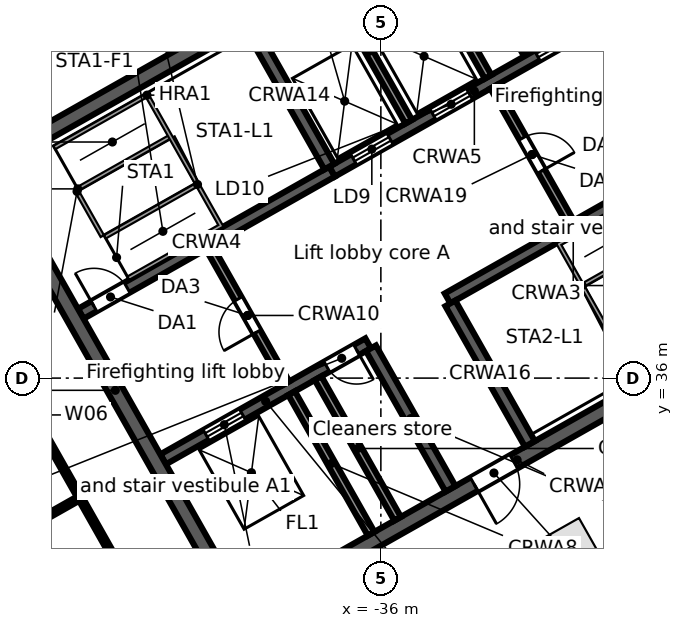
"""IFC4 building model, lengths in metres.
Left out: names, types, materials, properties, quantities, classifications, styles, units other than length and angle.
Written with IfcOpenShell. Run it as: python <this file> out.ifc"""

import sys

from ifc_helpers import new_model, si_unit, direction, frame, frame_2d, origin, origin_2d, place, context, subcontext, project, spatial, rectangle, extrude, element, fill, save


model = new_model("IFC4")
c1 = context("Model", 3, precision=1e-05, world=origin(), true_north=direction((0.0, 1.0)))
c2 = subcontext(c1, "Body", "Model", "MODEL_VIEW")
j1 = project(units=[si_unit("LENGTHUNIT", "METRE"), si_unit("PLANEANGLEUNIT", "RADIAN")], contexts=[c1])
p1 = place(None, origin())
s1 = spatial("IfcSite", under=j1, at=p1, CompositionType="ELEMENT")
p2 = place(p1, origin())
s2 = spatial("IfcBuilding", under=s1, at=p2, CompositionType="ELEMENT")
p3 = place(p2, frame((0.0, 0.0, 343.1)))
s3 = spatial("IfcBuildingStorey", under=s2, at=p3, CompositionType="ELEMENT", Elevation=343.1)
p4 = place(p3, frame((-30.976, 31.635, 0.0), z_axis=(0.0, 0.0, 1.0), x_axis=(0.87035569594, 0.492423560103, 0.0)))
e1 = element("IfcColumn", 1, at=p4, inside=s3, PredefinedType="COLUMN", context=c2, shape_type="SweptSolid", body=[
    extrude(rectangle(XDim=1.0, YDim=1.0, at=origin_2d()), origin(), (0.0, 0.0, 1.0), 3.8),
])
p5 = place(p3, frame((-44.115, 26.507, 0.0), z_axis=(0.0, 0.0, 1.0), x_axis=(-0.857166583633, 0.515039268311, 0.0)))
e2 = element("IfcWall", 2, at=p5, inside=s3, PredefinedType="STANDARD", context=c2, shape_type="SweptSolid", body=[
    extrude(rectangle(XDim=17.106, YDim=0.25, at=frame_2d((8.553, 0.0))), origin(), (0.0, 0.0, 1.0), 3.5),
])
p6 = place(p5, frame((14.417, 0.0, 0.8)))
e3 = element("IfcOpeningElement", 3, at=p6, cuts=e2, PredefinedType="OPENING", context=c2, shape_type="SweptSolid", body=[
    extrude(rectangle(XDim=2.4, YDim=2.2, at=frame_2d((1.2, 1.1))), frame((0.0, 0.135, 0.0), z_axis=(0.0, -1.0, 0.0), x_axis=(1.0, 0.0, 0.0)), (0.0, 0.0, 1.0), 0.27),
])
p7 = place(p5, frame((11.584, 0.0, 0.8)))
e4 = element("IfcOpeningElement", 4, at=p7, cuts=e2, PredefinedType="OPENING", context=c2, shape_type="SweptSolid", body=[
    extrude(rectangle(XDim=2.4, YDim=2.2, at=frame_2d((1.2, 1.1))), frame((0.0, 0.135, 0.0), z_axis=(0.0, -1.0, 0.0), x_axis=(1.0, 0.0, 0.0)), (0.0, 0.0, 1.0), 0.27),
])
p8 = place(p5, frame((8.75, 0.0, 0.8)))
e5 = element("IfcOpeningElement", 5, at=p8, cuts=e2, PredefinedType="OPENING", context=c2, shape_type="SweptSolid", body=[
    extrude(rectangle(XDim=2.4, YDim=2.2, at=frame_2d((1.2, 1.1))), frame((0.0, 0.135, 0.0), z_axis=(0.0, -1.0, 0.0), x_axis=(1.0, 0.0, 0.0)), (0.0, 0.0, 1.0), 0.27),
])
p9 = place(p5, frame((5.917, 0.0, 0.8)))
e6 = element("IfcOpeningElement", 6, at=p9, cuts=e2, PredefinedType="OPENING", context=c2, shape_type="SweptSolid", body=[
    extrude(rectangle(XDim=2.4, YDim=2.2, at=frame_2d((1.2, 1.1))), frame((0.0, 0.135, 0.0), z_axis=(0.0, -1.0, 0.0), x_axis=(1.0, 0.0, 0.0)), (0.0, 0.0, 1.0), 0.27),
])
p10 = place(p5, frame((3.084, 0.0, 0.8)))
e7 = element("IfcOpeningElement", 7, at=p10, cuts=e2, PredefinedType="OPENING", context=c2, shape_type="SweptSolid", body=[
    extrude(rectangle(XDim=2.4, YDim=2.2, at=frame_2d((1.2, 1.1))), frame((0.0, 0.135, 0.0), z_axis=(0.0, -1.0, 0.0), x_axis=(1.0, 0.0, 0.0)), (0.0, 0.0, 1.0), 0.27),
])
p11 = place(p5, frame((0.25, 0.0, 0.8)))
e8 = element("IfcOpeningElement", 8, at=p11, cuts=e2, PredefinedType="OPENING", context=c2, shape_type="SweptSolid", body=[
    extrude(rectangle(XDim=2.4, YDim=2.2, at=frame_2d((1.2, 1.1))), frame((0.0, 0.135, 0.0), z_axis=(0.0, -1.0, 0.0), x_axis=(1.0, 0.0, 0.0)), (0.0, 0.0, 1.0), 0.27),
])
p12 = place(p3, frame((-3.017, 46.293, 0.0), z_axis=(0.0, 0.0, 1.0), x_axis=(-0.870355474887, -0.492423950812, 0.0)))
e9 = element("IfcWall", 9, at=p12, inside=s3, PredefinedType="STANDARD", context=c2, shape_type="SweptSolid", body=[
    extrude(rectangle(XDim=40.34, YDim=0.25, at=frame_2d((20.17, 0.0))), origin(), (0.0, 0.0, 1.0), 3.5),
])
p13 = place(p12, frame((37.428, 0.0, 0.8)))
e10 = element("IfcOpeningElement", 10, at=p13, cuts=e9, PredefinedType="OPENING", context=c2, shape_type="SweptSolid", body=[
    extrude(rectangle(XDim=2.4, YDim=2.2, at=frame_2d((1.2, 1.1))), frame((0.0, 0.135, 0.0), z_axis=(0.0, -1.0, 0.0), x_axis=(1.0, 0.0, 0.0)), (0.0, 0.0, 1.0), 0.27),
])
p14 = place(p12, frame((34.372, 0.0, 0.0)))
e11 = element("IfcOpeningElement", 11, at=p14, cuts=e9, PredefinedType="OPENING", context=c2, shape_type="SweptSolid", body=[
    extrude(rectangle(XDim=1.8, YDim=2.4, at=frame_2d((0.9, 1.2))), frame((0.0, 0.135, 0.0), z_axis=(0.0, -1.0, 0.0), x_axis=(1.0, 0.0, 0.0)), (0.0, 0.0, 1.0), 0.27),
])
p15 = place(p12, frame((30.716, 0.0, 0.8)))
e12 = element("IfcOpeningElement", 12, at=p15, cuts=e9, PredefinedType="OPENING", context=c2, shape_type="SweptSolid", body=[
    extrude(rectangle(XDim=2.4, YDim=2.2, at=frame_2d((1.2, 1.1))), frame((0.0, 0.135, 0.0), z_axis=(0.0, -1.0, 0.0), x_axis=(1.0, 0.0, 0.0)), (0.0, 0.0, 1.0), 0.27),
])
p16 = place(p12, frame((27.36, 0.0, 0.8)))
e13 = element("IfcOpeningElement", 13, at=p16, cuts=e9, PredefinedType="OPENING", context=c2, shape_type="SweptSolid", body=[
    extrude(rectangle(XDim=2.4, YDim=2.2, at=frame_2d((1.2, 1.1))), frame((0.0, 0.135, 0.0), z_axis=(0.0, -1.0, 0.0), x_axis=(1.0, 0.0, 0.0)), (0.0, 0.0, 1.0), 0.27),
])
p17 = place(p12, frame((24.304, 0.0, 0.0)))
e14 = element("IfcOpeningElement", 14, at=p17, cuts=e9, PredefinedType="OPENING", context=c2, shape_type="SweptSolid", body=[
    extrude(rectangle(XDim=1.8, YDim=2.4, at=frame_2d((0.9, 1.2))), frame((0.0, 0.135, 0.0), z_axis=(0.0, -1.0, 0.0), x_axis=(1.0, 0.0, 0.0)), (0.0, 0.0, 1.0), 0.27),
])
p18 = place(p12, frame((20.648, 0.0, 0.8)))
e15 = element("IfcOpeningElement", 15, at=p18, cuts=e9, PredefinedType="OPENING", context=c2, shape_type="SweptSolid", body=[
    extrude(rectangle(XDim=2.4, YDim=2.2, at=frame_2d((1.2, 1.1))), frame((0.0, 0.135, 0.0), z_axis=(0.0, -1.0, 0.0), x_axis=(1.0, 0.0, 0.0)), (0.0, 0.0, 1.0), 0.27),
])
p19 = place(p12, frame((17.292, 0.0, 0.8)))
e16 = element("IfcOpeningElement", 16, at=p19, cuts=e9, PredefinedType="OPENING", context=c2, shape_type="SweptSolid", body=[
    extrude(rectangle(XDim=2.4, YDim=2.2, at=frame_2d((1.2, 1.1))), frame((0.0, 0.135, 0.0), z_axis=(0.0, -1.0, 0.0), x_axis=(1.0, 0.0, 0.0)), (0.0, 0.0, 1.0), 0.27),
])
p20 = place(p12, frame((14.236, 0.0, 0.0)))
e17 = element("IfcOpeningElement", 17, at=p20, cuts=e9, PredefinedType="OPENING", context=c2, shape_type="SweptSolid", body=[
    extrude(rectangle(XDim=1.8, YDim=2.4, at=frame_2d((0.9, 1.2))), frame((0.0, 0.135, 0.0), z_axis=(0.0, -1.0, 0.0), x_axis=(1.0, 0.0, 0.0)), (0.0, 0.0, 1.0), 0.27),
])
p21 = place(p12, frame((10.58, 0.0, 0.8)))
e18 = element("IfcOpeningElement", 18, at=p21, cuts=e9, PredefinedType="OPENING", context=c2, shape_type="SweptSolid", body=[
    extrude(rectangle(XDim=2.4, YDim=2.2, at=frame_2d((1.2, 1.1))), frame((0.0, 0.135, 0.0), z_axis=(0.0, -1.0, 0.0), x_axis=(1.0, 0.0, 0.0)), (0.0, 0.0, 1.0), 0.27),
])
p22 = place(p12, frame((7.224, 0.0, 0.8)))
e19 = element("IfcOpeningElement", 19, at=p22, cuts=e9, PredefinedType="OPENING", context=c2, shape_type="SweptSolid", body=[
    extrude(rectangle(XDim=2.4, YDim=2.2, at=frame_2d((1.2, 1.1))), frame((0.0, 0.135, 0.0), z_axis=(0.0, -1.0, 0.0), x_axis=(1.0, 0.0, 0.0)), (0.0, 0.0, 1.0), 0.27),
])
p23 = place(p12, frame((4.168, 0.0, 0.0)))
e20 = element("IfcOpeningElement", 20, at=p23, cuts=e9, PredefinedType="OPENING", context=c2, shape_type="SweptSolid", body=[
    extrude(rectangle(XDim=1.8, YDim=2.4, at=frame_2d((0.9, 1.2))), frame((0.0, 0.135, 0.0), z_axis=(0.0, -1.0, 0.0), x_axis=(1.0, 0.0, 0.0)), (0.0, 0.0, 1.0), 0.27),
])
p24 = place(p12, frame((0.512, 0.0, 0.8)))
e21 = element("IfcOpeningElement", 21, at=p24, cuts=e9, PredefinedType="OPENING", context=c2, shape_type="SweptSolid", body=[
    extrude(rectangle(XDim=2.4, YDim=2.2, at=frame_2d((1.2, 1.1))), frame((0.0, 0.135, 0.0), z_axis=(0.0, -1.0, 0.0), x_axis=(1.0, 0.0, 0.0)), (0.0, 0.0, 1.0), 0.27),
])
p25 = place(p3, frame((-39.813, 29.662, 0.0), z_axis=(0.0, 0.0, 1.0), x_axis=(0.870350116061, 0.492433422375, 0.0)))
e22 = element("IfcWall", 22, at=p25, inside=s3, PredefinedType="SOLIDWALL", context=c2, shape_type="SweptSolid", body=[
    extrude(rectangle(XDim=17.0, YDim=0.4, at=frame_2d((8.5, 0.0))), origin(), (0.0, 0.0, 1.0), 3.5),
])
p26 = place(p25, frame((7.2, 0.0, 0.0)))
e23 = element("IfcOpeningElement", 23, at=p26, cuts=e22, PredefinedType="OPENING", context=c2, shape_type="SweptSolid", body=[
    extrude(rectangle(XDim=1.2, YDim=2.1, at=frame_2d((0.6, 1.05))), frame((0.0, 0.21, 0.0), z_axis=(0.0, -1.0, 0.0), x_axis=(1.0, 0.0, 0.0)), (0.0, 0.0, 1.0), 0.42),
])
p27 = place(p3, frame((-41.73, 33.863, 0.0), z_axis=(0.0, 0.0, 1.0), x_axis=(0.870350800578, 0.492432212525, 0.0)))
e24 = element("IfcWall", 24, at=p27, inside=s3, PredefinedType="SOLIDWALL", context=c2, shape_type="SweptSolid", body=[
    extrude(rectangle(XDim=6.2, YDim=0.3, at=frame_2d((3.1, 0.0))), origin(), (0.0, 0.0, 1.0), 3.5),
])
p28 = place(p27, frame((1.3, 0.0, 0.0)))
e25 = element("IfcOpeningElement", 25, at=p28, cuts=e24, PredefinedType="OPENING", context=c2, shape_type="SweptSolid", body=[
    extrude(rectangle(XDim=1.1, YDim=2.1, at=frame_2d((0.55, 1.05))), frame((0.0, 0.16, 0.0), z_axis=(0.0, -1.0, 0.0), x_axis=(1.0, 0.0, 0.0)), (0.0, 0.0, 1.0), 0.32),
])
p29 = place(p27, frame((4.95, 0.0, 0.0)))
e26 = element("IfcOpeningElement", 26, at=p29, cuts=e24, PredefinedType="OPENING", context=c2, shape_type="SweptSolid", body=[
    extrude(rectangle(XDim=0.9, YDim=2.1, at=frame_2d((0.45, 1.05))), frame((0.0, 0.16, 0.0), z_axis=(0.0, -1.0, 0.0), x_axis=(1.0, 0.0, 0.0)), (0.0, 0.0, 1.0), 0.32),
])
p30 = place(p3, frame((-34.245, 38.097, 0.0), z_axis=(0.0, 0.0, 1.0), x_axis=(0.870356351998, 0.492422400523, 0.0)))
e27 = element("IfcWall", 27, at=p30, inside=s3, PredefinedType="SOLIDWALL", context=c2, shape_type="SweptSolid", body=[
    extrude(rectangle(XDim=7.6, YDim=0.3, at=frame_2d((3.8, 0.0))), origin(), (0.0, 0.0, 1.0), 3.5),
])
p31 = place(p30, frame((6.2, 0.0, 0.0)))
e28 = element("IfcOpeningElement", 28, at=p31, cuts=e27, PredefinedType="OPENING", context=c2, shape_type="SweptSolid", body=[
    extrude(rectangle(XDim=1.0, YDim=2.1, at=frame_2d((0.5, 1.05))), frame((0.0, 0.16, 0.0), z_axis=(0.0, -1.0, 0.0), x_axis=(1.0, 0.0, 0.0)), (0.0, 0.0, 1.0), 0.32),
])
p32 = place(p3, frame((-43.897, 37.692, 0.0), z_axis=(0.0, 0.0, 1.0), x_axis=(0.870356351998, 0.492422400523, 0.0)))
e29 = element("IfcWall", 29, at=p32, inside=s3, PredefinedType="SOLIDWALL", context=c2, shape_type="SweptSolid", body=[
    extrude(rectangle(XDim=7.6, YDim=0.3, at=frame_2d((3.8, 0.0))), origin(), (0.0, 0.0, 1.0), 3.5),
])
p33 = place(p32, frame((0.4, 0.0, 0.0)))
e30 = element("IfcOpeningElement", 30, at=p33, cuts=e29, PredefinedType="OPENING", context=c2, shape_type="SweptSolid", body=[
    extrude(rectangle(XDim=1.0, YDim=2.1, at=frame_2d((0.5, 1.05))), frame((0.0, 0.16, 0.0), z_axis=(0.0, -1.0, 0.0), x_axis=(1.0, 0.0, 0.0)), (0.0, 0.0, 1.0), 0.32),
])
p34 = place(p3, frame((-37.282, 41.435, 0.0), z_axis=(0.0, 0.0, 1.0), x_axis=(0.870361315115, 0.492413628113, 0.0)))
e31 = element("IfcWall", 31, at=p34, inside=s3, PredefinedType="SOLIDWALL", context=c2, shape_type="SweptSolid", body=[
    extrude(rectangle(XDim=8.6, YDim=0.3, at=frame_2d((4.3, 0.0))), origin(), (0.0, 0.0, 1.0), 3.5),
])
p35 = place(p34, frame((0.65, 0.0, 0.0)))
e32 = element("IfcOpeningElement", 32, at=p35, cuts=e31, PredefinedType="OPENING", context=c2, shape_type="SweptSolid", body=[
    extrude(rectangle(XDim=1.1, YDim=2.1, at=frame_2d((0.55, 1.05))), frame((0.0, 0.16, 0.0), z_axis=(0.0, -1.0, 0.0), x_axis=(1.0, 0.0, 0.0)), (0.0, 0.0, 1.0), 0.32),
])
p36 = place(p34, frame((3.05, 0.0, 0.0)))
e33 = element("IfcOpeningElement", 33, at=p36, cuts=e31, PredefinedType="OPENING", context=c2, shape_type="SweptSolid", body=[
    extrude(rectangle(XDim=1.1, YDim=2.1, at=frame_2d((0.55, 1.05))), frame((0.0, 0.16, 0.0), z_axis=(0.0, -1.0, 0.0), x_axis=(1.0, 0.0, 0.0)), (0.0, 0.0, 1.0), 0.32),
])
p37 = place(p34, frame((6.2, 0.0, 0.0)))
e34 = element("IfcOpeningElement", 34, at=p37, cuts=e31, PredefinedType="OPENING", context=c2, shape_type="SweptSolid", body=[
    extrude(rectangle(XDim=1.1, YDim=2.1, at=frame_2d((0.55, 1.05))), frame((0.0, 0.16, 0.0), z_axis=(0.0, -1.0, 0.0), x_axis=(1.0, 0.0, 0.0)), (0.0, 0.0, 1.0), 0.32),
])
p38 = place(p3, frame((-46.51, 41.499, 0.0), z_axis=(0.0, 0.0, 1.0), x_axis=(0.870356271124, 0.492422543467, 0.0)))
e35 = element("IfcWall", 35, at=p38, inside=s3, PredefinedType="SOLIDWALL", context=c2, shape_type="SweptSolid", body=[
    extrude(rectangle(XDim=17.0, YDim=0.4, at=frame_2d((8.5, 0.0))), origin(), (0.0, 0.0, 1.0), 3.5),
])
p39 = place(p3, frame((-46.238, 41.423, 0.0), z_axis=(0.0, 0.0, 1.0), x_axis=(0.492421663121, -0.870356769198, 0.0)))
e36 = element("IfcWall", 36, at=p39, inside=s3, PredefinedType="SOLIDWALL", context=c2, shape_type="SweptSolid", body=[
    extrude(rectangle(XDim=13.2, YDim=0.4, at=frame_2d((6.6, 0.0))), origin(), (0.0, 0.0, 1.0), 3.5),
])
p40 = place(p3, frame((-38.349, 35.603, 0.0), z_axis=(0.0, 0.0, 1.0), x_axis=(0.492397924348, -0.870370199454, 0.0)))
e37 = element("IfcWall", 37, at=p40, inside=s3, PredefinedType="SOLIDWALL", context=c2, shape_type="SweptSolid", body=[
    extrude(rectangle(XDim=4.25, YDim=0.2, at=frame_2d((2.125, 0.0))), origin(), (0.0, 0.0, 1.0), 3.5),
])
p41 = place(p3, frame((-40.516, 39.433, 0.0), z_axis=(0.0, 0.0, 1.0), x_axis=(0.492453559952, -0.87033872216, 0.0)))
e38 = element("IfcWall", 38, at=p41, inside=s3, PredefinedType="PARTITIONING", context=c2, shape_type="SweptSolid", body=[
    extrude(rectangle(XDim=4.1, YDim=0.2, at=frame_2d((2.05, 0.0))), origin(), (0.0, 0.0, 1.0), 3.5),
])
p42 = place(p41, frame((1.55, 0.0, 0.0)))
e39 = element("IfcOpeningElement", 39, at=p42, cuts=e38, PredefinedType="OPENING", context=c2, shape_type="SweptSolid", body=[
    extrude(rectangle(XDim=1.0, YDim=2.1, at=frame_2d((0.5, 1.05))), frame((0.0, 0.11, 0.0), z_axis=(0.0, -1.0, 0.0), x_axis=(1.0, 0.0, 0.0)), (0.0, 0.0, 1.0), 0.22),
])
p43 = place(p3, frame((-37.653, 35.997, 0.0), z_axis=(0.0, 0.0, 1.0), x_axis=(0.492422543467, -0.870356271124, 0.0)))
e40 = element("IfcWall", 40, at=p43, inside=s3, PredefinedType="SOLIDWALL", context=c2, shape_type="SweptSolid", body=[
    extrude(rectangle(XDim=4.25, YDim=0.2, at=frame_2d((2.125, 0.0))), origin(), (0.0, 0.0, 1.0), 3.5),
])
for number, where, z_axis, x_axis in (
    (41, (-36.26, 36.785, 0.0), (0.0, 0.0, 1.0), (0.492, -0.87, 0.0)),
    (42, (-39.449, 45.264, 0.0), (0.0, 0.0, 1.0), (0.492, -0.87, 0.0)),
    (43, (-34.171, 37.967, 0.0), (0.0, 0.0, 1.0), (0.492, -0.87, 0.0)),
):
    element("IfcWall", number, at=place(p3, frame(where, z_axis=z_axis, x_axis=x_axis)), inside=s3, PredefinedType="SOLIDWALL", context=c2, shape_type="SweptSolid", body=[
        extrude(rectangle(XDim=4.25, YDim=0.3, at=frame_2d((2.125, 0.0))), origin(), (0.0, 0.0, 1.0), 3.5),
    ])
p44 = place(p3, frame((-37.36, 46.446, 0.0), z_axis=(0.0, 0.0, 1.0), x_axis=(0.492422543467, -0.870356271124, 0.0)))
e44 = element("IfcWall", 44, at=p44, inside=s3, PredefinedType="SOLIDWALL", context=c2, shape_type="SweptSolid", body=[
    extrude(rectangle(XDim=4.25, YDim=0.2, at=frame_2d((2.125, 0.0))), origin(), (0.0, 0.0, 1.0), 3.5),
])
p45 = place(p3, frame((-33.031, 43.667, 0.0), z_axis=(0.0, 0.0, 1.0), x_axis=(0.492408451753, -0.87036424366, 0.0)))
e45 = element("IfcWall", 45, at=p45, inside=s3, PredefinedType="PARTITIONING", context=c2, shape_type="SweptSolid", body=[
    extrude(rectangle(XDim=4.1, YDim=0.2, at=frame_2d((2.05, 0.0))), origin(), (0.0, 0.0, 1.0), 3.5),
])
p46 = place(p45, frame((1.55, 0.0, 0.0)))
e46 = element("IfcOpeningElement", 46, at=p46, cuts=e45, PredefinedType="OPENING", context=c2, shape_type="SweptSolid", body=[
    extrude(rectangle(XDim=1.0, YDim=2.1, at=frame_2d((0.5, 1.05))), frame((0.0, 0.11, 0.0), z_axis=(0.0, -1.0, 0.0), x_axis=(1.0, 0.0, 0.0)), (0.0, 0.0, 1.0), 0.22),
])
p47 = place(p3, frame((-35.271, 47.628, 0.0), z_axis=(0.0, 0.0, 1.0), x_axis=(0.492422543467, -0.870356271124, 0.0)))
e47 = element("IfcWall", 47, at=p47, inside=s3, PredefinedType="SOLIDWALL", context=c2, shape_type="SweptSolid", body=[
    extrude(rectangle(XDim=4.25, YDim=0.2, at=frame_2d((2.125, 0.0))), origin(), (0.0, 0.0, 1.0), 3.5),
])
p48 = place(p3, frame((-31.79, 49.597, 0.0), z_axis=(0.0, 0.0, 1.0), x_axis=(0.492421663121, -0.870356769198, 0.0)))
e48 = element("IfcWall", 48, at=p48, inside=s3, PredefinedType="SOLIDWALL", context=c2, shape_type="SweptSolid", body=[
    extrude(rectangle(XDim=13.2, YDim=0.4, at=frame_2d((6.6, 0.0))), origin(), (0.0, 0.0, 1.0), 3.5),
])
p49 = place(p3, frame((-49.335, 29.79, 0.0), z_axis=(0.0, 0.0, 1.0), x_axis=(0.870383085237, 0.492375146542, 0.0)))
e49 = element("IfcWall", 49, at=p49, inside=s3, PredefinedType="PARTITIONING", context=c2, shape_type="SweptSolid", body=[
    extrude(rectangle(XDim=6.225, YDim=0.125, at=frame_2d((3.112, 0.0))), origin(), (0.0, 0.0, 1.0), 2.88),
])
p50 = place(p3, frame((-46.38, 37.206, 0.0), z_axis=(0.0, 0.0, 1.0), x_axis=(0.49260101091, -0.870255275221, 0.0)))
e50 = element("IfcWall", 50, at=p50, inside=s3, PredefinedType="PARTITIONING", context=c2, shape_type="SweptSolid", body=[
    extrude(rectangle(XDim=5.0, YDim=0.125, at=frame_2d((2.5, 0.0))), origin(), (0.0, 0.0, 1.0), 2.88),
])
p51 = place(p50, frame((1.95, 0.0, 0.0)))
e51 = element("IfcOpeningElement", 51, at=p51, cuts=e50, PredefinedType="OPENING", context=c2, shape_type="SweptSolid", body=[
    extrude(rectangle(XDim=0.9, YDim=2.1, at=frame_2d((0.45, 1.05))), frame((0.0, 0.073, 0.0), z_axis=(0.0, -1.0, 0.0), x_axis=(1.0, 0.0, 0.0)), (0.0, 0.0, 1.0), 0.145),
])
p52 = place(p3, frame((-43.917, 32.855, 0.0), z_axis=(0.0, 0.0, 1.0), x_axis=(0.492446757002, -0.870342571358, 0.0)))
e52 = element("IfcWall", 52, at=p52, inside=s3, PredefinedType="PARTITIONING", context=c2, shape_type="SweptSolid", body=[
    extrude(rectangle(XDim=7.187, YDim=0.125, at=frame_2d((3.593, 0.0))), origin(), (0.0, 0.0, 1.0), 2.88),
])
p53 = place(p52, frame((3.2, 0.0, 0.0)))
e53 = element("IfcOpeningElement", 53, at=p53, cuts=e52, PredefinedType="OPENING", context=c2, shape_type="SweptSolid", body=[
    extrude(rectangle(XDim=0.9, YDim=2.1, at=frame_2d((0.45, 1.05))), frame((0.0, 0.073, 0.0), z_axis=(0.0, -1.0, 0.0), x_axis=(1.0, 0.0, 0.0)), (0.0, 0.0, 1.0), 0.145),
])
p54 = place(p35, origin())
e54 = element("IfcDoor", 54, at=p54, inside=s3, OperationType="DOUBLE_DOOR_SLIDING", PredefinedType="DOOR", context=c2, shape_type="SweptSolid", body=[
    extrude(rectangle(XDim=1.1, YDim=2.1, at=frame_2d((0.55, 1.05))), frame((0.0, 0.025, 0.0), z_axis=(0.0, -1.0, 0.0), x_axis=(1.0, 0.0, 0.0)), (0.0, 0.0, 1.0), 0.05),
])
fill(e32, e54)
p55 = place(p36, origin())
e55 = element("IfcDoor", 55, at=p55, inside=s3, OperationType="DOUBLE_DOOR_SLIDING", PredefinedType="DOOR", context=c2, shape_type="SweptSolid", body=[
    extrude(rectangle(XDim=1.1, YDim=2.1, at=frame_2d((0.55, 1.05))), frame((0.0, 0.025, 0.0), z_axis=(0.0, -1.0, 0.0), x_axis=(1.0, 0.0, 0.0)), (0.0, 0.0, 1.0), 0.05),
])
fill(e33, e55)
p56 = place(p37, origin())
e56 = element("IfcDoor", 56, at=p56, inside=s3, OperationType="DOUBLE_DOOR_SLIDING", PredefinedType="DOOR", context=c2, shape_type="SweptSolid", body=[
    extrude(rectangle(XDim=1.1, YDim=2.1, at=frame_2d((0.55, 1.05))), frame((0.0, 0.025, 0.0), z_axis=(0.0, -1.0, 0.0), x_axis=(1.0, 0.0, 0.0)), (0.0, 0.0, 1.0), 0.05),
])
fill(e34, e56)
p57 = place(p28, origin())
e57 = element("IfcDoor", 57, at=p57, inside=s3, OperationType="DOUBLE_DOOR_SLIDING", PredefinedType="DOOR", context=c2, shape_type="SweptSolid", body=[
    extrude(rectangle(XDim=1.1, YDim=2.1, at=frame_2d((0.55, 1.05))), frame((0.0, 0.025, 0.0), z_axis=(0.0, -1.0, 0.0), x_axis=(1.0, 0.0, 0.0)), (0.0, 0.0, 1.0), 0.05),
])
fill(e25, e57)
p58 = place(p33, origin())
e58 = element("IfcDoor", 58, at=p58, inside=s3, OperationType="SINGLE_SWING_LEFT", PredefinedType="DOOR", context=c2, shape_type="SweptSolid", body=[
    extrude(rectangle(XDim=1.0, YDim=2.1, at=frame_2d((0.5, 1.05))), frame((0.0, 0.025, 0.0), z_axis=(0.0, -1.0, 0.0), x_axis=(1.0, 0.0, 0.0)), (0.0, 0.0, 1.0), 0.05),
])
fill(e30, e58)
p59 = place(p42, frame((1.0, 0.0, 0.0), z_axis=(0.0, 0.0, 1.0), x_axis=(-1.0, 0.0, 0.0)))
e59 = element("IfcDoor", 59, at=p59, inside=s3, OperationType="SINGLE_SWING_LEFT", PredefinedType="DOOR", context=c2, shape_type="SweptSolid", body=[
    extrude(rectangle(XDim=1.0, YDim=2.1, at=frame_2d((0.5, 1.05))), frame((0.0, 0.025, 0.0), z_axis=(0.0, -1.0, 0.0), x_axis=(1.0, 0.0, 0.0)), (0.0, 0.0, 1.0), 0.05),
])
fill(e39, e59)
p60 = place(p46, origin())
e60 = element("IfcDoor", 60, at=p60, inside=s3, OperationType="SINGLE_SWING_RIGHT", PredefinedType="DOOR", context=c2, shape_type="SweptSolid", body=[
    extrude(rectangle(XDim=1.0, YDim=2.1, at=frame_2d((0.5, 1.05))), frame((0.0, 0.025, 0.0), z_axis=(0.0, -1.0, 0.0), x_axis=(1.0, 0.0, 0.0)), (0.0, 0.0, 1.0), 0.05),
])
fill(e46, e60)
p61 = place(p26, frame((1.2, 0.0, 0.0), z_axis=(0.0, 0.0, 1.0), x_axis=(-1.0, 0.0, 0.0)))
e61 = element("IfcDoor", 61, at=p61, inside=s3, OperationType="SINGLE_SWING_RIGHT", PredefinedType="DOOR", context=c2, shape_type="SweptSolid", body=[
    extrude(rectangle(XDim=1.2, YDim=2.1, at=frame_2d((0.6, 1.05))), frame((0.0, 0.025, 0.0), z_axis=(0.0, -1.0, 0.0), x_axis=(1.0, 0.0, 0.0)), (0.0, 0.0, 1.0), 0.05),
])
fill(e23, e61)
p62 = place(p29, frame((0.9, 0.0, 0.0), z_axis=(0.0, 0.0, 1.0), x_axis=(-1.0, 0.0, 0.0)))
e62 = element("IfcDoor", 62, at=p62, inside=s3, OperationType="SINGLE_SWING_LEFT", PredefinedType="DOOR", context=c2, shape_type="SweptSolid", body=[
    extrude(rectangle(XDim=0.9, YDim=2.1, at=frame_2d((0.45, 1.05))), frame((0.0, 0.025, 0.0), z_axis=(0.0, -1.0, 0.0), x_axis=(1.0, 0.0, 0.0)), (0.0, 0.0, 1.0), 0.05),
])
fill(e26, e62)
save(model, sys.argv[1])
